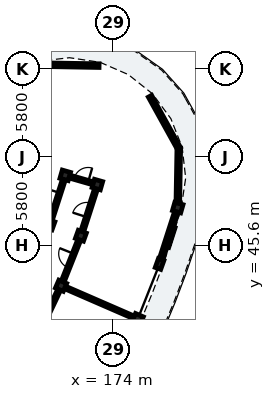
"""IFC4 building model, lengths in metres.
Left out: names, types, materials, properties, quantities, classifications, styles, units other than length and angle.
Written with IfcOpenShell. Run it as: python <this file> out.ifc"""

import sys

from ifc_helpers import new_model, si_unit, direction, frame, frame_2d, origin, origin_2d, place, context, subcontext, project, spatial, rectangle, extrude, element, fill, save


model = new_model("IFC4")
c1 = context("Model", 3, precision=1e-05, world=origin(), true_north=direction((0.0, 1.0)))
c2 = subcontext(c1, "Body", "Model", "MODEL_VIEW")
j1 = project(units=[si_unit("LENGTHUNIT", "METRE"), si_unit("PLANEANGLEUNIT", "RADIAN")], contexts=[c1])
p1 = place(None, origin())
s1 = spatial("IfcSite", under=j1, at=p1, CompositionType="ELEMENT")
p2 = place(p1, origin())
s2 = spatial("IfcBuilding", under=s1, at=p2, CompositionType="ELEMENT")
p3 = place(p2, frame((0.0, 0.0, 12.2)))
s3 = spatial("IfcBuildingStorey", under=s2, at=p3, CompositionType="ELEMENT", Elevation=12.2)
for number, where, z_axis, x_axis in (
    (1, (170.567, 42.948, 0.0), (0.0, 0.0, 1.0), (0.917, -0.399, 0.0)),
    (2, (175.611, 40.754, 0.0), (0.0, 0.0, 1.0), (0.917, -0.399, 0.0)),
    (3, (169.8, 46.979, 0.0), (0.0, 0.0, 1.0), (0.941, -0.338, 0.0)),
    (4, (171.871, 46.236, 0.0), (0.0, 0.0, 1.0), (0.941, -0.338, 0.0)),
):
    element("IfcColumn", number, at=place(p3, frame(where, z_axis=z_axis, x_axis=x_axis)), inside=s3, PredefinedType="COLUMN", context=c2, shape_type="SweptSolid", body=[
        extrude(rectangle(XDim=0.56, YDim=0.56, at=origin_2d()), origin(), (0.0, 0.0, 1.0), 3.105),
    ])
p4 = place(p3, frame((177.047, 44.377, 0.0), z_axis=(0.0, 0.0, 1.0), x_axis=(0.941176015256, -0.337916718003, 0.0)))
e5 = element("IfcColumn", 5, at=p4, inside=s3, PredefinedType="PILASTER", context=c2, shape_type="SweptSolid", body=[
    extrude(rectangle(XDim=0.38, YDim=0.62, at=origin_2d()), origin(), (0.0, 0.0, 1.0), 3.105),
])
for number, where, z_axis, x_axis in (
    (6, (170.841, 50.208, 0.0), (0.0, 0.0, 1.0), (0.961, -0.276, 0.0)),
    (7, (172.956, 49.602, 0.0), (0.0, 0.0, 1.0), (0.961, -0.276, 0.0)),
    (8, (178.243, 48.086, 0.0), (0.0, 0.0, 1.0), (0.961, -0.276, 0.0)),
):
    element("IfcColumn", number, at=place(p3, frame(where, z_axis=z_axis, x_axis=x_axis)), inside=s3, PredefinedType="COLUMN", context=c2, shape_type="SweptSolid", body=[
        extrude(rectangle(XDim=0.56, YDim=0.56, at=origin_2d()), origin(), (0.0, 0.0, 1.0), 3.105),
    ])
p5 = place(p3, frame((177.096, 44.529, 0.0), z_axis=(0.0, 0.0, 1.0), x_axis=(0.306949591136, 0.951725773793, 0.0)))
e9 = element("IfcWall", 9, at=p5, inside=s3, PredefinedType="SOLIDWALL", context=c2, shape_type="SweptSolid", body=[
    extrude(rectangle(XDim=3.487, YDim=0.24, at=frame_2d((1.743, 0.0))), origin(), (0.0, 0.0, 1.0), 2.355),
])
p6 = place(p5, frame((1.023, 0.0, 0.35)))
e10 = element("IfcOpeningElement", 10, at=p6, cuts=e9, PredefinedType="OPENING", context=c2, shape_type="SweptSolid", body=[
    extrude(rectangle(XDim=1.44, YDim=1.66, at=frame_2d((0.72, 0.83))), frame((0.0, 0.13, 0.0), z_axis=(0.0, -1.0, 0.0), x_axis=(1.0, 0.0, 0.0)), (0.0, 0.0, 1.0), 0.26),
])
p7 = place(p3, frame((169.159, 57.493, 0.0), z_axis=(0.0, 0.0, 1.0), x_axis=(0.999847005776, -0.017491856396, 0.0)))
e11 = element("IfcWall", 11, at=p7, inside=s3, PredefinedType="SOLIDWALL", context=c2, shape_type="SweptSolid", body=[
    extrude(rectangle(XDim=3.908, YDim=0.24, at=frame_2d((1.954, 0.0))), origin(), (0.0, 0.0, 1.0), 2.355),
])
p8 = place(p3, frame((176.417, 55.412, 0.0), z_axis=(0.0, 0.0, 1.0), x_axis=(0.48481530532, -0.874616555828, 0.0)))
e12 = element("IfcWall", 12, at=p8, inside=s3, PredefinedType="SOLIDWALL", context=c2, shape_type="SweptSolid", body=[
    extrude(rectangle(XDim=3.908, YDim=0.24, at=frame_2d((1.954, 0.0))), origin(), (0.0, 0.0, 1.0), 2.355),
])
p9 = place(p8, frame((0.979, 0.0, 0.4)))
e13 = element("IfcOpeningElement", 13, at=p9, cuts=e12, PredefinedType="OPENING", context=c2, shape_type="SweptSolid", body=[
    extrude(rectangle(XDim=1.95, YDim=1.78, at=frame_2d((0.975, 0.89))), frame((0.0, 0.13, 0.0), z_axis=(0.0, -1.0, 0.0), x_axis=(1.0, 0.0, 0.0)), (0.0, 0.0, 1.0), 0.26),
])
p10 = place(p3, frame((178.311, 51.993, 0.0), z_axis=(0.0, 0.0, 1.0), x_axis=(-0.017428315893, -0.999848115368, 0.0)))
e14 = element("IfcWall", 14, at=p10, inside=s3, PredefinedType="SOLIDWALL", context=c2, shape_type="SweptSolid", body=[
    extrude(rectangle(XDim=3.908, YDim=0.24, at=frame_2d((1.954, 0.0))), origin(), (0.0, 0.0, 1.0), 2.355),
])
p11 = place(p3, frame((169.201, 40.068, 0.0), z_axis=(0.0, 0.0, 1.0), x_axis=(0.428493237107, 0.903544988229, 0.0)))
e15 = element("IfcWall", 15, at=p11, inside=s3, PredefinedType="PARTITIONING", context=c2, shape_type="SweptSolid", body=[
    extrude(rectangle(XDim=2.837, YDim=0.195, at=frame_2d((1.418, 0.0))), origin(), (0.0, 0.0, 1.0), 2.37),
])
p12 = place(p11, frame((0.954, 0.0, 0.0)))
e16 = element("IfcOpeningElement", 16, at=p12, cuts=e15, PredefinedType="OPENING", context=c2, shape_type="SweptSolid", body=[
    extrude(rectangle(XDim=0.93, YDim=2.12, at=frame_2d((0.465, 1.06))), frame((0.0, 0.107, 0.0), z_axis=(0.0, -1.0, 0.0), x_axis=(1.0, 0.0, 0.0)), (0.0, 0.0, 1.0), 0.215),
])
p13 = place(p3, frame((170.934, 42.788, 0.0), z_axis=(0.0, 0.0, 1.0), x_axis=(0.917071707884, -0.398722312643, 0.0)))
e17 = element("IfcWall", 17, at=p13, inside=s3, PredefinedType="PARTITIONING", context=c2, shape_type="SweptSolid", body=[
    extrude(rectangle(XDim=4.7, YDim=0.175, at=frame_2d((2.35, 0.0))), origin(), (0.0, 0.0, 1.0), 2.37),
])
p14 = place(p3, frame((170.696, 43.273, 0.0), z_axis=(0.0, 0.0, 1.0), x_axis=(0.368584691693, 0.929594172233, 0.0)))
e18 = element("IfcWall", 18, at=p14, inside=s3, PredefinedType="PARTITIONING", context=c2, shape_type="SweptSolid", body=[
    extrude(rectangle(XDim=2.837, YDim=0.195, at=frame_2d((1.418, 0.0))), origin(), (0.0, 0.0, 1.0), 2.37),
])
p15 = place(p14, frame((0.924, 0.0, 0.0)))
e19 = element("IfcOpeningElement", 19, at=p15, cuts=e18, PredefinedType="OPENING", context=c2, shape_type="SweptSolid", body=[
    extrude(rectangle(XDim=0.99, YDim=2.16, at=frame_2d((0.495, 1.08))), frame((0.0, 0.107, 0.0), z_axis=(0.0, -1.0, 0.0), x_axis=(1.0, 0.0, 0.0)), (0.0, 0.0, 1.0), 0.215),
])
p16 = place(p3, frame((171.978, 46.569, 0.0), z_axis=(0.0, 0.0, 1.0), x_axis=(0.30694495224, 0.951727269912, 0.0)))
e20 = element("IfcWall", 20, at=p16, inside=s3, PredefinedType="PARTITIONING", context=c2, shape_type="SweptSolid", body=[
    extrude(rectangle(XDim=2.837, YDim=0.195, at=frame_2d((1.418, 0.0))), origin(), (0.0, 0.0, 1.0), 2.37),
])
p17 = place(p16, frame((0.934, 0.0, 0.0)))
e21 = element("IfcOpeningElement", 21, at=p17, cuts=e20, PredefinedType="OPENING", context=c2, shape_type="SweptSolid", body=[
    extrude(rectangle(XDim=0.97, YDim=2.15, at=frame_2d((0.485, 1.075))), frame((0.0, 0.107, 0.0), z_axis=(0.0, -1.0, 0.0), x_axis=(1.0, 0.0, 0.0)), (0.0, 0.0, 1.0), 0.215),
])
p18 = place(p3, frame((169.907, 47.312, 0.0), z_axis=(0.0, 0.0, 1.0), x_axis=(0.306883578189, 0.951747061691, 0.0)))
e22 = element("IfcWall", 22, at=p18, inside=s3, PredefinedType="PARTITIONING", context=c2, shape_type="SweptSolid", body=[
    extrude(rectangle(XDim=2.693, YDim=0.195, at=frame_2d((1.346, 0.0))), origin(), (0.0, 0.0, 1.0), 2.37),
])
p19 = place(p18, frame((0.862, 0.0, 0.0)))
e23 = element("IfcOpeningElement", 23, at=p19, cuts=e22, PredefinedType="OPENING", context=c2, shape_type="SweptSolid", body=[
    extrude(rectangle(XDim=0.97, YDim=2.15, at=frame_2d((0.485, 1.075))), frame((0.0, 0.107, 0.0), z_axis=(0.0, -1.0, 0.0), x_axis=(1.0, 0.0, 0.0)), (0.0, 0.0, 1.0), 0.215),
])
p20 = place(p3, frame((170.889, 50.194, 0.0), z_axis=(0.0, 0.0, 1.0), x_axis=(0.961264701934, -0.275626872449, 0.0)))
e24 = element("IfcWall", 24, at=p20, inside=s3, PredefinedType="PARTITIONING", context=c2, shape_type="SweptSolid", body=[
    extrude(rectangle(XDim=2.1, YDim=0.195, at=frame_2d((1.05, 0.0))), origin(), (0.0, 0.0, 1.0), 2.37),
])
p21 = place(p20, frame((0.57, 0.0, 0.0)))
e25 = element("IfcOpeningElement", 25, at=p21, cuts=e24, PredefinedType="OPENING", context=c2, shape_type="SweptSolid", body=[
    extrude(rectangle(XDim=0.95, YDim=2.13, at=frame_2d((0.475, 1.065))), frame((0.0, 0.107, 0.0), z_axis=(0.0, -1.0, 0.0), x_axis=(1.0, 0.0, 0.0)), (0.0, 0.0, 1.0), 0.215),
])
p22 = place(p6, origin())
e26 = element("IfcWindow", 26, at=p22, inside=s3, PartitioningType="SINGLE_PANEL", PredefinedType="WINDOW", context=c2, shape_type="SweptSolid", body=[
    extrude(rectangle(XDim=1.44, YDim=1.66, at=frame_2d((0.72, 0.83))), frame((0.0, 0.03, 0.0), z_axis=(0.0, -1.0, 0.0), x_axis=(1.0, 0.0, 0.0)), (0.0, 0.0, 1.0), 0.06),
])
fill(e10, e26)
p23 = place(p9, origin())
e27 = element("IfcWindow", 27, at=p23, inside=s3, PartitioningType="SINGLE_PANEL", PredefinedType="WINDOW", context=c2, shape_type="SweptSolid", body=[
    extrude(rectangle(XDim=1.95, YDim=1.78, at=frame_2d((0.975, 0.89))), frame((0.0, 0.03, 0.0), z_axis=(0.0, -1.0, 0.0), x_axis=(1.0, 0.0, 0.0)), (0.0, 0.0, 1.0), 0.06),
])
fill(e13, e27)
p24 = place(p12, origin())
e28 = element("IfcDoor", 28, at=p24, inside=s3, OperationType="SINGLE_SWING_LEFT", PredefinedType="DOOR", context=c2, shape_type="SweptSolid", body=[
    extrude(rectangle(XDim=0.93, YDim=2.12, at=frame_2d((0.465, 1.06))), frame((0.0, 0.025, 0.0), z_axis=(0.0, -1.0, 0.0), x_axis=(1.0, 0.0, 0.0)), (0.0, 0.0, 1.0), 0.05),
])
fill(e16, e28)
p25 = place(p15, origin())
e29 = element("IfcDoor", 29, at=p25, inside=s3, OperationType="SINGLE_SWING_RIGHT", PredefinedType="DOOR", context=c2, shape_type="SweptSolid", body=[
    extrude(rectangle(XDim=0.99, YDim=2.16, at=frame_2d((0.495, 1.08))), frame((0.0, 0.025, 0.0), z_axis=(0.0, -1.0, 0.0), x_axis=(1.0, 0.0, 0.0)), (0.0, 0.0, 1.0), 0.05),
])
fill(e19, e29)
p26 = place(p17, origin())
e30 = element("IfcDoor", 30, at=p26, inside=s3, OperationType="SINGLE_SWING_LEFT", PredefinedType="DOOR", context=c2, shape_type="SweptSolid", body=[
    extrude(rectangle(XDim=0.97, YDim=2.15, at=frame_2d((0.485, 1.075))), frame((0.0, 0.025, 0.0), z_axis=(0.0, -1.0, 0.0), x_axis=(1.0, 0.0, 0.0)), (0.0, 0.0, 1.0), 0.05),
])
fill(e21, e30)
p27 = place(p19, origin())
e31 = element("IfcDoor", 31, at=p27, inside=s3, OperationType="SINGLE_SWING_RIGHT", PredefinedType="DOOR", context=c2, shape_type="SweptSolid", body=[
    extrude(rectangle(XDim=0.97, YDim=2.15, at=frame_2d((0.485, 1.075))), frame((0.0, 0.025, 0.0), z_axis=(0.0, -1.0, 0.0), x_axis=(1.0, 0.0, 0.0)), (0.0, 0.0, 1.0), 0.05),
])
fill(e23, e31)
p28 = place(p21, origin())
e32 = element("IfcDoor", 32, at=p28, inside=s3, OperationType="SINGLE_SWING_RIGHT", PredefinedType="DOOR", context=c2, shape_type="SweptSolid", body=[
    extrude(rectangle(XDim=0.95, YDim=2.13, at=frame_2d((0.475, 1.065))), frame((0.0, 0.025, 0.0), z_axis=(0.0, -1.0, 0.0), x_axis=(1.0, 0.0, 0.0)), (0.0, 0.0, 1.0), 0.05),
])
fill(e25, e32)
save(model, sys.argv[1])
